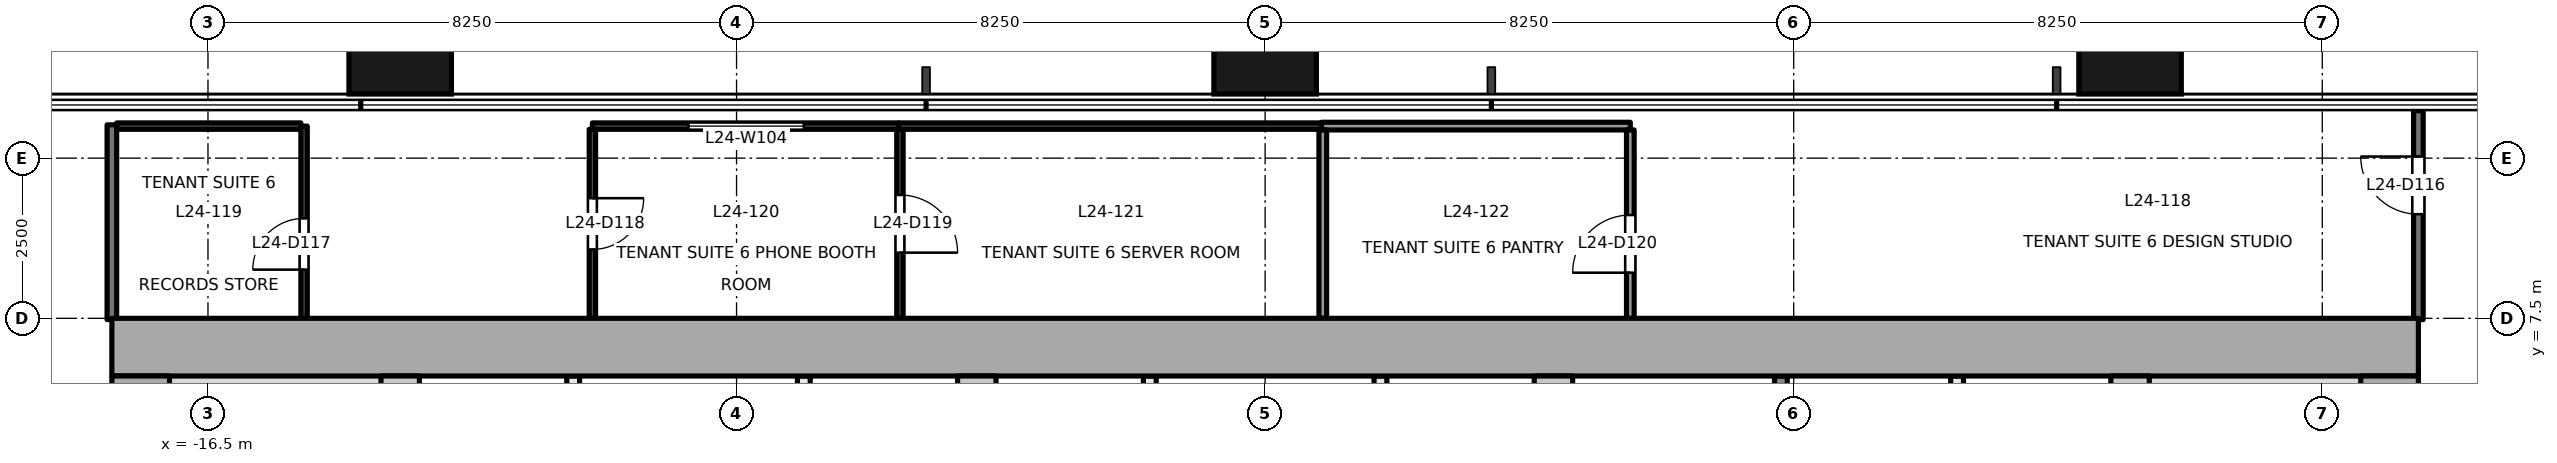
"""IFC4 building model, lengths in metres.
Left out: names, types, materials, properties, quantities, classifications, styles, units other than length and angle.
Written with IfcOpenShell. Run it as: python <this file> out.ifc"""

import sys

from ifc_helpers import new_model, si_unit, direction, frame, frame_2d, origin, origin_2d, place, context, subcontext, project, spatial, rectangle, extrude, element, fill, save


model = new_model("IFC4")
c1 = context("Model", 3, precision=1e-05, world=origin(), true_north=direction((0.0, 1.0)))
c2 = subcontext(c1, "Body", "Model", "MODEL_VIEW")
j1 = project(units=[si_unit("LENGTHUNIT", "METRE"), si_unit("PLANEANGLEUNIT", "RADIAN")], contexts=[c1])
p1 = place(None, origin())
s1 = spatial("IfcSite", under=j1, at=p1, CompositionType="ELEMENT")
p2 = place(p1, origin())
s2 = spatial("IfcBuilding", under=s1, at=p2, CompositionType="ELEMENT")
p3 = place(p2, frame((0.0, 0.0, 107.7)))
s3 = spatial("IfcBuildingStorey", under=s2, at=p3, CompositionType="ELEMENT", Elevation=107.7)
for number, where, z_axis, x_axis in (
    (1, (-13.5, 11.9, -0.2), (0.0, 0.0, 1.0), (1.0, 0.0, 0.0)),
    (2, (0.0, 11.9, -0.2), (0.0, 0.0, 1.0), (1.0, 0.0, 0.0)),
    (3, (13.5, 11.9, -0.2), (0.0, 0.0, 1.0), (1.0, 0.0, 0.0)),
):
    element("IfcColumn", number, at=place(p3, frame(where, z_axis=z_axis, x_axis=x_axis)), inside=s3, PredefinedType="COLUMN", context=c2, shape_type="SweptSolid", body=[
        extrude(rectangle(XDim=1.6, YDim=1.8, at=origin_2d()), origin(), (0.0, 0.0, 1.0), 4.0),
    ])
p4 = place(p3, frame((-18.0, 7.05, -0.2), z_axis=(0.0, 0.0, 1.0), x_axis=(1.0, 0.0, 0.0)))
e4 = element("IfcWall", 4, at=p4, inside=s3, PredefinedType="SHEAR", context=c2, shape_type="SweptSolid", body=[
    extrude(rectangle(XDim=36.0, YDim=0.9, at=frame_2d((18.0, 0.0))), origin(), (0.0, 0.0, 1.0), 4.0),
])
p5 = place(p3, frame((-17.55, -6.6, -0.2), z_axis=(0.0, 0.0, 1.0), x_axis=(0.0, 1.0, 0.0)))
e5 = element("IfcWall", 5, at=p5, inside=s3, PredefinedType="SHEAR", context=c2, shape_type="SweptSolid", body=[
    extrude(rectangle(XDim=13.2, YDim=0.9, at=frame_2d((6.6, 0.0))), origin(), (0.0, 0.0, 1.0), 4.0),
])
p6 = place(p5, frame((4.55, 0.0, 0.2)))
e6 = element("IfcOpeningElement", 6, at=p6, cuts=e5, PredefinedType="OPENING", context=c2, shape_type="SweptSolid", body=[
    extrude(rectangle(XDim=1.2, YDim=2.1, at=frame_2d((0.6, 1.05))), frame((0.0, 0.46, 0.0), z_axis=(0.0, -1.0, 0.0), x_axis=(1.0, 0.0, 0.0)), (0.0, 0.0, 1.0), 0.921),
])
p7 = place(p3, frame((17.55, -6.6, -0.2), z_axis=(0.0, 0.0, 1.0), x_axis=(0.0, 1.0, 0.0)))
e7 = element("IfcWall", 7, at=p7, inside=s3, PredefinedType="SHEAR", context=c2, shape_type="SweptSolid", body=[
    extrude(rectangle(XDim=13.2, YDim=0.9, at=frame_2d((6.6, 0.0))), origin(), (0.0, 0.0, 1.0), 4.0),
])
p8 = place(p7, frame((4.55, 0.0, 0.2)))
e8 = element("IfcOpeningElement", 8, at=p8, cuts=e7, PredefinedType="OPENING", context=c2, shape_type="SweptSolid", body=[
    extrude(rectangle(XDim=1.2, YDim=2.1, at=frame_2d((0.6, 1.05))), frame((0.0, 0.46, 0.0), z_axis=(0.0, -1.0, 0.0), x_axis=(1.0, 0.0, 0.0)), (0.0, 0.0, 1.0), 0.921),
])
for number, where, z_axis, x_axis in (
    (9, (-13.5, -6.6, -0.2), (0.0, 0.0, 1.0), (0.0, 1.0, 0.0)),
    (10, (-4.5, -6.6, -0.2), (0.0, 0.0, 1.0), (0.0, 1.0, 0.0)),
    (11, (4.5, -6.6, -0.2), (0.0, 0.0, 1.0), (0.0, 1.0, 0.0)),
    (12, (13.5, -6.6, -0.2), (0.0, 0.0, 1.0), (0.0, 1.0, 0.0)),
):
    element("IfcWall", number, at=place(p3, frame(where, z_axis=z_axis, x_axis=x_axis)), inside=s3, PredefinedType="SHEAR", context=c2, shape_type="SweptSolid", body=[
        extrude(rectangle(XDim=13.2, YDim=0.6, at=frame_2d((6.6, 0.0))), origin(), (0.0, 0.0, 1.0), 4.0),
    ])
p9 = place(p3, frame((-10.8, -6.6, 0.0), z_axis=(0.0, 0.0, 1.0), x_axis=(0.0, 1.0, 0.0)))
e13 = element("IfcWall", 13, at=p9, inside=s3, PredefinedType="PARTITIONING", context=c2, shape_type="SweptSolid", body=[
    extrude(rectangle(XDim=13.2, YDim=0.2, at=frame_2d((6.6, 0.0))), origin(), (0.0, 0.0, 1.0), 3.8),
])
p10 = place(p9, frame((0.55, 0.0, 0.0)))
e14 = element("IfcOpeningElement", 14, at=p10, cuts=e13, PredefinedType="OPENING", context=c2, shape_type="SweptSolid", body=[
    extrude(rectangle(XDim=0.9, YDim=2.1, at=frame_2d((0.45, 1.05))), frame((0.0, 0.111, 0.0), z_axis=(0.0, -1.0, 0.0), x_axis=(1.0, 0.0, 0.0)), (0.0, 0.0, 1.0), 0.221),
])
p11 = place(p9, frame((2.9, 0.0, 0.0)))
e15 = element("IfcOpeningElement", 15, at=p11, cuts=e13, PredefinedType="OPENING", context=c2, shape_type="SweptSolid", body=[
    extrude(rectangle(XDim=1.2, YDim=2.1, at=frame_2d((0.6, 1.05))), frame((0.0, 0.111, 0.0), z_axis=(0.0, -1.0, 0.0), x_axis=(1.0, 0.0, 0.0)), (0.0, 0.0, 1.0), 0.221),
])
p12 = place(p9, frame((5.7, 0.0, 0.0)))
e16 = element("IfcOpeningElement", 16, at=p12, cuts=e13, PredefinedType="OPENING", context=c2, shape_type="SweptSolid", body=[
    extrude(rectangle(XDim=1.2, YDim=2.1, at=frame_2d((0.6, 1.05))), frame((0.0, 0.111, 0.0), z_axis=(0.0, -1.0, 0.0), x_axis=(1.0, 0.0, 0.0)), (0.0, 0.0, 1.0), 0.221),
])
p13 = place(p9, frame((8.5, 0.0, 0.0)))
e17 = element("IfcOpeningElement", 17, at=p13, cuts=e13, PredefinedType="OPENING", context=c2, shape_type="SweptSolid", body=[
    extrude(rectangle(XDim=1.2, YDim=2.1, at=frame_2d((0.6, 1.05))), frame((0.0, 0.111, 0.0), z_axis=(0.0, -1.0, 0.0), x_axis=(1.0, 0.0, 0.0)), (0.0, 0.0, 1.0), 0.221),
])
p14 = place(p9, frame((11.3, 0.0, 0.0)))
e18 = element("IfcOpeningElement", 18, at=p14, cuts=e13, PredefinedType="OPENING", context=c2, shape_type="SweptSolid", body=[
    extrude(rectangle(XDim=1.2, YDim=2.1, at=frame_2d((0.6, 1.05))), frame((0.0, 0.111, 0.0), z_axis=(0.0, -1.0, 0.0), x_axis=(1.0, 0.0, 0.0)), (0.0, 0.0, 1.0), 0.221),
])
p15 = place(p3, frame((-7.2, -6.6, 0.0), z_axis=(0.0, 0.0, 1.0), x_axis=(0.0, 1.0, 0.0)))
e19 = element("IfcWall", 19, at=p15, inside=s3, PredefinedType="PARTITIONING", context=c2, shape_type="SweptSolid", body=[
    extrude(rectangle(XDim=13.2, YDim=0.2, at=frame_2d((6.6, 0.0))), origin(), (0.0, 0.0, 1.0), 3.8),
])
p16 = place(p15, frame((0.55, 0.0, 0.0)))
e20 = element("IfcOpeningElement", 20, at=p16, cuts=e19, PredefinedType="OPENING", context=c2, shape_type="SweptSolid", body=[
    extrude(rectangle(XDim=0.9, YDim=2.1, at=frame_2d((0.45, 1.05))), frame((0.0, 0.111, 0.0), z_axis=(0.0, -1.0, 0.0), x_axis=(1.0, 0.0, 0.0)), (0.0, 0.0, 1.0), 0.221),
])
p17 = place(p15, frame((2.9, 0.0, 0.0)))
e21 = element("IfcOpeningElement", 21, at=p17, cuts=e19, PredefinedType="OPENING", context=c2, shape_type="SweptSolid", body=[
    extrude(rectangle(XDim=1.2, YDim=2.1, at=frame_2d((0.6, 1.05))), frame((0.0, 0.111, 0.0), z_axis=(0.0, -1.0, 0.0), x_axis=(1.0, 0.0, 0.0)), (0.0, 0.0, 1.0), 0.221),
])
p18 = place(p15, frame((5.7, 0.0, 0.0)))
e22 = element("IfcOpeningElement", 22, at=p18, cuts=e19, PredefinedType="OPENING", context=c2, shape_type="SweptSolid", body=[
    extrude(rectangle(XDim=1.2, YDim=2.1, at=frame_2d((0.6, 1.05))), frame((0.0, 0.111, 0.0), z_axis=(0.0, -1.0, 0.0), x_axis=(1.0, 0.0, 0.0)), (0.0, 0.0, 1.0), 0.221),
])
p19 = place(p15, frame((8.5, 0.0, 0.0)))
e23 = element("IfcOpeningElement", 23, at=p19, cuts=e19, PredefinedType="OPENING", context=c2, shape_type="SweptSolid", body=[
    extrude(rectangle(XDim=1.2, YDim=2.1, at=frame_2d((0.6, 1.05))), frame((0.0, 0.111, 0.0), z_axis=(0.0, -1.0, 0.0), x_axis=(1.0, 0.0, 0.0)), (0.0, 0.0, 1.0), 0.221),
])
p20 = place(p15, frame((11.3, 0.0, 0.0)))
e24 = element("IfcOpeningElement", 24, at=p20, cuts=e19, PredefinedType="OPENING", context=c2, shape_type="SweptSolid", body=[
    extrude(rectangle(XDim=1.2, YDim=2.1, at=frame_2d((0.6, 1.05))), frame((0.0, 0.111, 0.0), z_axis=(0.0, -1.0, 0.0), x_axis=(1.0, 0.0, 0.0)), (0.0, 0.0, 1.0), 0.221),
])
p21 = place(p3, frame((-1.8, -6.6, 0.0), z_axis=(0.0, 0.0, 1.0), x_axis=(0.0, 1.0, 0.0)))
e25 = element("IfcWall", 25, at=p21, inside=s3, PredefinedType="PARTITIONING", context=c2, shape_type="SweptSolid", body=[
    extrude(rectangle(XDim=13.2, YDim=0.2, at=frame_2d((6.6, 0.0))), origin(), (0.0, 0.0, 1.0), 3.8),
])
p22 = place(p21, frame((0.55, 0.0, 0.0)))
e26 = element("IfcOpeningElement", 26, at=p22, cuts=e25, PredefinedType="OPENING", context=c2, shape_type="SweptSolid", body=[
    extrude(rectangle(XDim=0.9, YDim=2.1, at=frame_2d((0.45, 1.05))), frame((0.0, 0.111, 0.0), z_axis=(0.0, -1.0, 0.0), x_axis=(1.0, 0.0, 0.0)), (0.0, 0.0, 1.0), 0.221),
])
p23 = place(p3, frame((1.8, -6.6, 0.0), z_axis=(0.0, 0.0, 1.0), x_axis=(0.0, 1.0, 0.0)))
e27 = element("IfcWall", 27, at=p23, inside=s3, PredefinedType="PARTITIONING", context=c2, shape_type="SweptSolid", body=[
    extrude(rectangle(XDim=13.2, YDim=0.2, at=frame_2d((6.6, 0.0))), origin(), (0.0, 0.0, 1.0), 3.8),
])
p24 = place(p23, frame((0.55, 0.0, 0.0)))
e28 = element("IfcOpeningElement", 28, at=p24, cuts=e27, PredefinedType="OPENING", context=c2, shape_type="SweptSolid", body=[
    extrude(rectangle(XDim=0.9, YDim=2.1, at=frame_2d((0.45, 1.05))), frame((0.0, 0.111, 0.0), z_axis=(0.0, -1.0, 0.0), x_axis=(1.0, 0.0, 0.0)), (0.0, 0.0, 1.0), 0.221),
])
p25 = place(p3, frame((8.05, -6.6, 0.0), z_axis=(0.0, 0.0, 1.0), x_axis=(0.0, 1.0, 0.0)))
e29 = element("IfcWall", 29, at=p25, inside=s3, PredefinedType="PARTITIONING", context=c2, shape_type="SweptSolid", body=[
    extrude(rectangle(XDim=13.2, YDim=0.2, at=frame_2d((6.6, 0.0))), origin(), (0.0, 0.0, 1.0), 3.8),
])
p26 = place(p25, frame((0.91, 0.0, 0.0)))
e30 = element("IfcOpeningElement", 30, at=p26, cuts=e29, PredefinedType="OPENING", context=c2, shape_type="SweptSolid", body=[
    extrude(rectangle(XDim=0.9, YDim=2.1, at=frame_2d((0.45, 1.05))), frame((0.0, 0.111, 0.0), z_axis=(0.0, -1.0, 0.0), x_axis=(1.0, 0.0, 0.0)), (0.0, 0.0, 1.0), 0.221),
])
p27 = place(p25, frame((3.46, 0.0, 0.0)))
e31 = element("IfcOpeningElement", 31, at=p27, cuts=e29, PredefinedType="OPENING", context=c2, shape_type="SweptSolid", body=[
    extrude(rectangle(XDim=0.9, YDim=2.1, at=frame_2d((0.45, 1.05))), frame((0.0, 0.111, 0.0), z_axis=(0.0, -1.0, 0.0), x_axis=(1.0, 0.0, 0.0)), (0.0, 0.0, 1.0), 0.221),
])
p28 = place(p25, frame((5.5, 0.0, 0.0)))
e32 = element("IfcOpeningElement", 32, at=p28, cuts=e29, PredefinedType="OPENING", context=c2, shape_type="SweptSolid", body=[
    extrude(rectangle(XDim=0.9, YDim=2.1, at=frame_2d((0.45, 1.05))), frame((0.0, 0.111, 0.0), z_axis=(0.0, -1.0, 0.0), x_axis=(1.0, 0.0, 0.0)), (0.0, 0.0, 1.0), 0.221),
])
p29 = place(p25, frame((11.9, 0.0, 0.0)))
e33 = element("IfcOpeningElement", 33, at=p29, cuts=e29, PredefinedType="OPENING", context=c2, shape_type="SweptSolid", body=[
    extrude(rectangle(XDim=1.1, YDim=2.1, at=frame_2d((0.55, 1.05))), frame((0.0, 0.111, 0.0), z_axis=(0.0, -1.0, 0.0), x_axis=(1.0, 0.0, 0.0)), (0.0, 0.0, 1.0), 0.221),
])
p30 = place(p3, frame((10.8, -6.6, 0.0), z_axis=(0.0, 0.0, 1.0), x_axis=(0.0, 1.0, 0.0)))
e34 = element("IfcWall", 34, at=p30, inside=s3, PredefinedType="PARTITIONING", context=c2, shape_type="SweptSolid", body=[
    extrude(rectangle(XDim=13.2, YDim=0.2, at=frame_2d((6.6, 0.0))), origin(), (0.0, 0.0, 1.0), 3.8),
])
p31 = place(p30, frame((0.7, 0.0, 0.0)))
e35 = element("IfcOpeningElement", 35, at=p31, cuts=e34, PredefinedType="OPENING", context=c2, shape_type="SweptSolid", body=[
    extrude(rectangle(XDim=1.2, YDim=2.1, at=frame_2d((0.6, 1.05))), frame((0.0, 0.111, 0.0), z_axis=(0.0, -1.0, 0.0), x_axis=(1.0, 0.0, 0.0)), (0.0, 0.0, 1.0), 0.221),
])
p32 = place(p30, frame((9.15, 0.0, 0.0)))
e36 = element("IfcOpeningElement", 36, at=p32, cuts=e34, PredefinedType="OPENING", context=c2, shape_type="SweptSolid", body=[
    extrude(rectangle(XDim=0.9, YDim=2.1, at=frame_2d((0.45, 1.05))), frame((0.0, 0.111, 0.0), z_axis=(0.0, -1.0, 0.0), x_axis=(1.0, 0.0, 0.0)), (0.0, 0.0, 1.0), 0.221),
])
p33 = place(p30, frame((11.55, 0.0, 0.0)))
e37 = element("IfcOpeningElement", 37, at=p33, cuts=e34, PredefinedType="OPENING", context=c2, shape_type="SweptSolid", body=[
    extrude(rectangle(XDim=0.9, YDim=2.1, at=frame_2d((0.45, 1.05))), frame((0.0, 0.111, 0.0), z_axis=(0.0, -1.0, 0.0), x_axis=(1.0, 0.0, 0.0)), (0.0, 0.0, 1.0), 0.221),
])
p34 = place(p3, frame((18.0, 7.48, 0.0), z_axis=(0.0, 0.0, 1.0), x_axis=(0.0, 1.0, 0.0)))
e38 = element("IfcWall", 38, at=p34, inside=s3, PredefinedType="PARTITIONING", context=c2, shape_type="SweptSolid", body=[
    extrude(rectangle(XDim=3.26, YDim=0.15, at=frame_2d((1.63, 0.0))), origin(), (0.0, 0.0, 1.0), 2.8),
])
p35 = place(p34, frame((1.645, 0.0, 0.0)))
e39 = element("IfcOpeningElement", 39, at=p35, cuts=e38, PredefinedType="OPENING", context=c2, shape_type="SweptSolid", body=[
    extrude(rectangle(XDim=0.9, YDim=2.1, at=frame_2d((0.45, 1.05))), frame((0.0, 0.085, 0.0), z_axis=(0.0, -1.0, 0.0), x_axis=(1.0, 0.0, 0.0)), (0.0, 0.0, 1.0), 0.171),
])
p36 = place(p3, frame((-18.0, 10.52, 0.0), z_axis=(0.0, 0.0, 1.0), x_axis=(0.0, -1.0, 0.0)))
e40 = element("IfcWall", 40, at=p36, inside=s3, PredefinedType="PARTITIONING", context=c2, shape_type="SweptSolid", body=[
    extrude(rectangle(XDim=3.04, YDim=0.15, at=frame_2d((1.52, 0.0))), origin(), (0.0, 0.0, 1.0), 3.8),
])
p37 = place(p3, frame((-15.05, 10.5, 0.0), z_axis=(0.0, 0.0, 1.0), x_axis=(-1.0, 0.0, 0.0)))
e41 = element("IfcWall", 41, at=p37, inside=s3, PredefinedType="PARTITIONING", context=c2, shape_type="SweptSolid", body=[
    extrude(rectangle(XDim=2.875, YDim=0.1, at=frame_2d((1.438, 0.0))), origin(), (0.0, 0.0, 1.0), 3.8),
])
p38 = place(p3, frame((-15.0, 7.5, 0.0), z_axis=(0.0, 0.0, 1.0), x_axis=(0.0, 1.0, 0.0)))
e42 = element("IfcWall", 42, at=p38, inside=s3, PredefinedType="PARTITIONING", context=c2, shape_type="SweptSolid", body=[
    extrude(rectangle(XDim=3.0, YDim=0.1, at=frame_2d((1.5, 0.0))), origin(), (0.0, 0.0, 1.0), 3.8),
])
p39 = place(p38, frame((0.76, 0.0, 0.0)))
e43 = element("IfcOpeningElement", 43, at=p39, cuts=e42, PredefinedType="OPENING", context=c2, shape_type="SweptSolid", body=[
    extrude(rectangle(XDim=0.8, YDim=2.1, at=frame_2d((0.4, 1.05))), frame((0.0, 0.061, 0.0), z_axis=(0.0, -1.0, 0.0), x_axis=(1.0, 0.0, 0.0)), (0.0, 0.0, 1.0), 0.121),
])
p40 = place(p3, frame((-10.5, 10.45, 0.0), z_axis=(0.0, 0.0, 1.0), x_axis=(0.0, -1.0, 0.0)))
e44 = element("IfcWall", 44, at=p40, inside=s3, PredefinedType="PARTITIONING", context=c2, shape_type="SweptSolid", body=[
    extrude(rectangle(XDim=2.95, YDim=0.1, at=frame_2d((1.475, 0.0))), origin(), (0.0, 0.0, 1.0), 3.8),
])
p41 = place(p40, frame((1.075, 0.0, 0.0)))
e45 = element("IfcOpeningElement", 45, at=p41, cuts=e44, PredefinedType="OPENING", context=c2, shape_type="SweptSolid", body=[
    extrude(rectangle(XDim=0.8, YDim=2.1, at=frame_2d((0.4, 1.05))), frame((0.0, 0.061, 0.0), z_axis=(0.0, -1.0, 0.0), x_axis=(1.0, 0.0, 0.0)), (0.0, 0.0, 1.0), 0.121),
])
p42 = place(p3, frame((-5.72, 10.5, 0.0), z_axis=(0.0, 0.0, 1.0), x_axis=(-1.0, 0.0, 0.0)))
e46 = element("IfcWall", 46, at=p42, inside=s3, PredefinedType="PARTITIONING", context=c2, shape_type="SweptSolid", body=[
    extrude(rectangle(XDim=4.78, YDim=0.1, at=frame_2d((2.39, 0.0))), origin(), (0.0, 0.0, 1.0), 3.5),
])
p43 = place(p42, frame((1.48, 0.0, 0.9)))
e47 = element("IfcOpeningElement", 47, at=p43, cuts=e46, PredefinedType="OPENING", context=c2, shape_type="SweptSolid", body=[
    extrude(rectangle(XDim=1.8, YDim=1.2, at=frame_2d((0.9, 0.6))), frame((0.0, 0.061, 0.0), z_axis=(0.0, -1.0, 0.0), x_axis=(1.0, 0.0, 0.0)), (0.0, 0.0, 1.0), 0.121),
])
p44 = place(p3, frame((0.88, 10.5, 0.0), z_axis=(0.0, 0.0, 1.0), x_axis=(-1.0, 0.0, 0.0)))
e48 = element("IfcWall", 48, at=p44, inside=s3, PredefinedType="PARTITIONING", context=c2, shape_type="SweptSolid", body=[
    extrude(rectangle(XDim=6.6, YDim=0.1, at=frame_2d((3.3, 0.0))), origin(), (0.0, 0.0, 1.0), 3.5),
])
p45 = place(p3, frame((5.7, 10.5, 0.0), z_axis=(0.0, 0.0, 1.0), x_axis=(-1.0, 0.0, 0.0)))
e49 = element("IfcWall", 49, at=p45, inside=s3, PredefinedType="PARTITIONING", context=c2, shape_type="SweptSolid", body=[
    extrude(rectangle(XDim=4.82, YDim=0.12, at=frame_2d((2.41, 0.0))), origin(), (0.0, 0.0, 1.0), 3.5),
])
p46 = place(p3, frame((5.7, 7.5, 0.0), z_axis=(0.0, 0.0, 1.0), x_axis=(0.0, 1.0, 0.0)))
e50 = element("IfcWall", 50, at=p46, inside=s3, PredefinedType="PARTITIONING", context=c2, shape_type="SweptSolid", body=[
    extrude(rectangle(XDim=2.94, YDim=0.12, at=frame_2d((1.47, 0.0))), origin(), (0.0, 0.0, 1.0), 3.8),
])
p47 = place(p46, frame((0.712, 0.0, 0.0)))
e51 = element("IfcOpeningElement", 51, at=p47, cuts=e50, PredefinedType="OPENING", context=c2, shape_type="SweptSolid", body=[
    extrude(rectangle(XDim=0.9, YDim=2.1, at=frame_2d((0.45, 1.05))), frame((0.0, 0.071, 0.0), z_axis=(0.0, -1.0, 0.0), x_axis=(1.0, 0.0, 0.0)), (0.0, 0.0, 1.0), 0.141),
])
p48 = place(p3, frame((-5.7, 10.45, 0.0), z_axis=(0.0, 0.0, 1.0), x_axis=(0.0, -1.0, 0.0)))
e52 = element("IfcWall", 52, at=p48, inside=s3, PredefinedType="PARTITIONING", context=c2, shape_type="SweptSolid", body=[
    extrude(rectangle(XDim=2.95, YDim=0.1, at=frame_2d((1.475, 0.0))), origin(), (0.0, 0.0, 1.0), 3.8),
])
p49 = place(p48, frame((1.025, 0.0, 0.0)))
e53 = element("IfcOpeningElement", 53, at=p49, cuts=e52, PredefinedType="OPENING", context=c2, shape_type="SweptSolid", body=[
    extrude(rectangle(XDim=0.9, YDim=2.1, at=frame_2d((0.45, 1.05))), frame((0.0, 0.061, 0.0), z_axis=(0.0, -1.0, 0.0), x_axis=(1.0, 0.0, 0.0)), (0.0, 0.0, 1.0), 0.121),
])
p50 = place(p3, frame((0.9, 10.44, 0.0), z_axis=(0.0, 0.0, 1.0), x_axis=(0.0, -1.0, 0.0)))
e54 = element("IfcWall", 54, at=p50, inside=s3, PredefinedType="PARTITIONING", context=c2, shape_type="SweptSolid", body=[
    extrude(rectangle(XDim=2.94, YDim=0.12, at=frame_2d((1.47, 0.0))), origin(), (0.0, 0.0, 1.0), 3.8),
])
p51 = place(p35, origin())
e55 = element("IfcDoor", 55, at=p51, inside=s3, OperationType="SINGLE_SWING_RIGHT", PredefinedType="DOOR", context=c2, shape_type="SweptSolid", body=[
    extrude(rectangle(XDim=0.9, YDim=2.1, at=frame_2d((0.45, 1.05))), frame((0.0, 0.025, 0.0), z_axis=(0.0, -1.0, 0.0), x_axis=(1.0, 0.0, 0.0)), (0.0, 0.0, 1.0), 0.05),
])
fill(e39, e55)
p52 = place(p39, origin())
e56 = element("IfcDoor", 56, at=p52, inside=s3, OperationType="SINGLE_SWING_LEFT", PredefinedType="DOOR", context=c2, shape_type="SweptSolid", body=[
    extrude(rectangle(XDim=0.8, YDim=2.1, at=frame_2d((0.4, 1.05))), frame((0.0, 0.025, 0.0), z_axis=(0.0, -1.0, 0.0), x_axis=(1.0, 0.0, 0.0)), (0.0, 0.0, 1.0), 0.05),
])
fill(e43, e56)
p53 = place(p41, origin())
e57 = element("IfcDoor", 57, at=p53, inside=s3, OperationType="SINGLE_SWING_LEFT", PredefinedType="DOOR", context=c2, shape_type="SweptSolid", body=[
    extrude(rectangle(XDim=0.8, YDim=2.1, at=frame_2d((0.4, 1.05))), frame((0.0, 0.025, 0.0), z_axis=(0.0, -1.0, 0.0), x_axis=(1.0, 0.0, 0.0)), (0.0, 0.0, 1.0), 0.05),
])
fill(e45, e57)
p54 = place(p49, origin())
e58 = element("IfcDoor", 58, at=p54, inside=s3, OperationType="SINGLE_SWING_RIGHT", PredefinedType="DOOR", context=c2, shape_type="SweptSolid", body=[
    extrude(rectangle(XDim=0.9, YDim=2.1, at=frame_2d((0.45, 1.05))), frame((0.0, 0.025, 0.0), z_axis=(0.0, -1.0, 0.0), x_axis=(1.0, 0.0, 0.0)), (0.0, 0.0, 1.0), 0.05),
])
fill(e53, e58)
p55 = place(p47, origin())
e59 = element("IfcDoor", 59, at=p55, inside=s3, OperationType="SINGLE_SWING_LEFT", PredefinedType="DOOR", context=c2, shape_type="SweptSolid", body=[
    extrude(rectangle(XDim=0.9, YDim=2.1, at=frame_2d((0.45, 1.05))), frame((0.0, 0.025, 0.0), z_axis=(0.0, -1.0, 0.0), x_axis=(1.0, 0.0, 0.0)), (0.0, 0.0, 1.0), 0.05),
])
fill(e51, e59)
p56 = place(p43, origin())
e60 = element("IfcWindow", 60, at=p56, inside=s3, PartitioningType="SINGLE_PANEL", PredefinedType="WINDOW", context=c2, shape_type="SweptSolid", body=[
    extrude(rectangle(XDim=1.8, YDim=1.2, at=frame_2d((0.9, 0.6))), frame((0.0, 0.03, 0.0), z_axis=(0.0, -1.0, 0.0), x_axis=(1.0, 0.0, 0.0)), (0.0, 0.0, 1.0), 0.06),
])
fill(e47, e60)
save(model, sys.argv[1])
